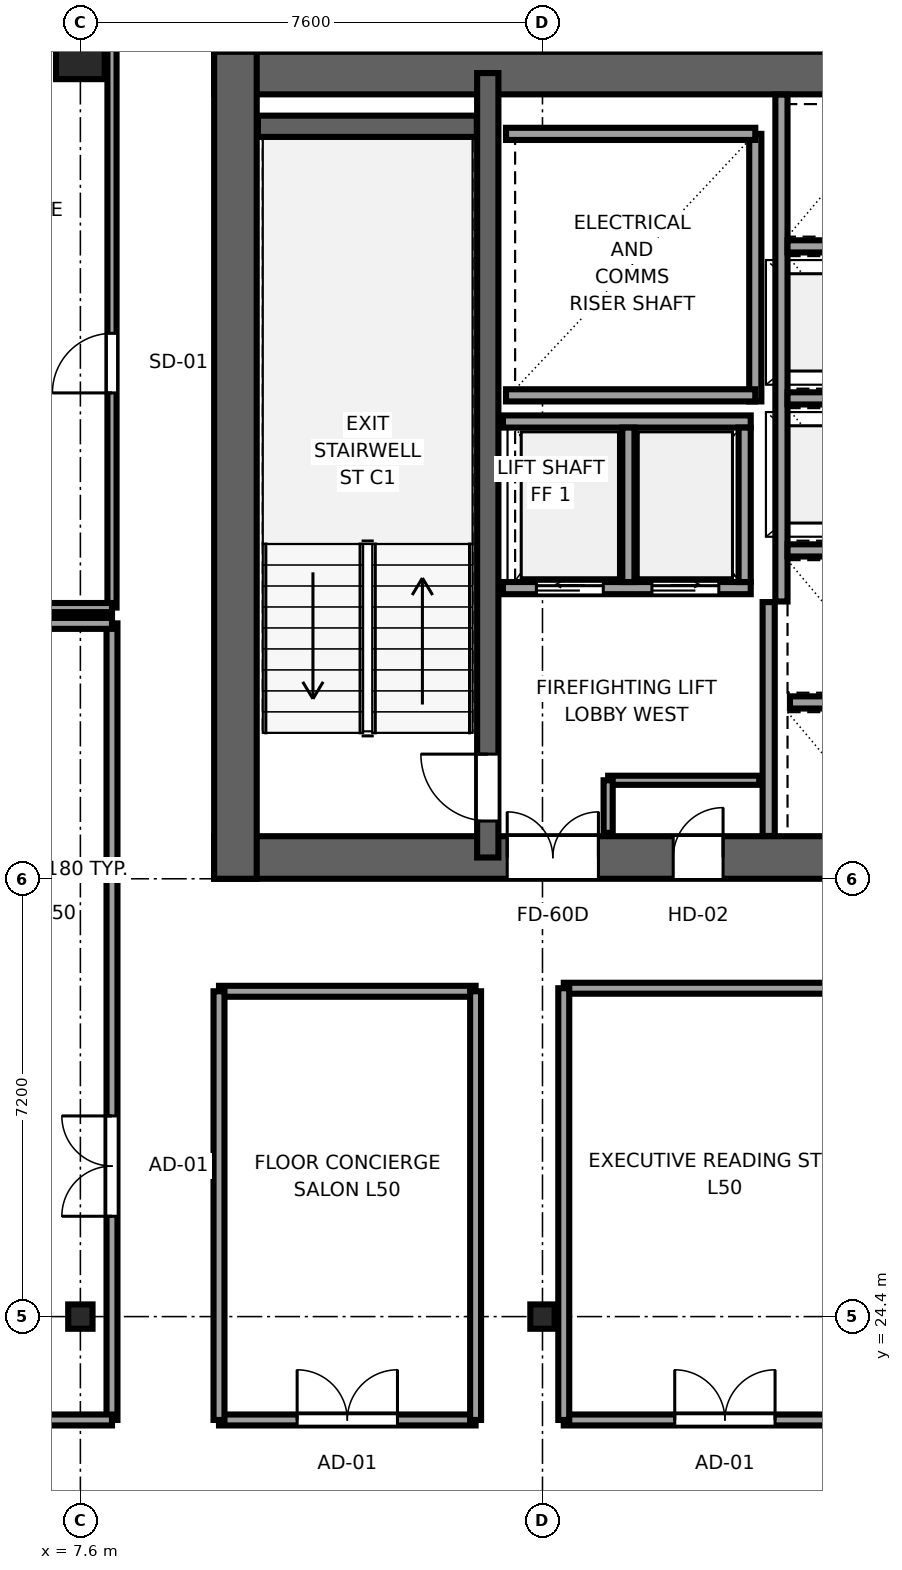
"""IFC4 building model, lengths in metres.
Left out: names, types, materials, properties, quantities, classifications, styles, units other than length and angle.
Written with IfcOpenShell. Run it as: python <this file> out.ifc"""

import sys

from ifc_helpers import new_model, si_unit, direction, frame, frame_2d, origin, origin_2d, place, context, subcontext, project, spatial, rectangle, i_section, extrude, source, transform, mapped, element, fill, save


model = new_model("IFC4")
c1 = context("Model", 3, precision=1e-05, world=origin(), true_north=direction((0.0, 1.0)))
c2 = subcontext(c1, "Body", "Model", "MODEL_VIEW")
j1 = project(units=[si_unit("LENGTHUNIT", "METRE"), si_unit("PLANEANGLEUNIT", "RADIAN")], contexts=[c1])
p1 = place(None, origin())
s1 = spatial("IfcSite", under=j1, at=p1, CompositionType="ELEMENT")
p2 = place(p1, origin())
s2 = spatial("IfcBuilding", under=s1, at=p2, CompositionType="ELEMENT")
p3 = place(p2, frame((0.0, 0.0, 191.1)))
s3 = spatial("IfcBuildingStorey", under=s2, at=p3, CompositionType="ELEMENT", Elevation=191.1)
p4 = place(p3, frame((9.8, 31.95, 0.0), z_axis=(0.0, 0.0, 1.0), x_axis=(1.0, 0.0, 0.0)))
e1 = element("IfcWall", 1, at=p4, inside=s3, PredefinedType="SHEAR", context=c2, shape_type="SweptSolid", body=[
    extrude(rectangle(XDim=26.4, YDim=0.7, at=frame_2d((13.2, 0.0))), origin(), (0.0, 0.0, 1.0), 3.55),
])
p5 = place(p4, frame((6.32, 0.0, 0.0), z_axis=(0.0, 0.0, 1.0), x_axis=(-1.0, 0.0, 0.0)))
e2 = element("IfcOpeningElement", 2, at=p5, cuts=e1, PredefinedType="OPENING", context=c2, shape_type="SweptSolid", body=[
    extrude(rectangle(XDim=1.5, YDim=2.04, at=frame_2d((0.75, 1.02))), frame((0.0, 0.36, 0.0), z_axis=(0.0, -1.0, 0.0), x_axis=(1.0, 0.0, 0.0)), (0.0, 0.0, 1.0), 0.72),
])
p6 = place(p4, frame((13.95, 0.0, 0.0), z_axis=(0.0, 0.0, 1.0), x_axis=(-1.0, 0.0, 0.0)))
e3 = element("IfcOpeningElement", 3, at=p6, cuts=e1, PredefinedType="OPENING", context=c2, shape_type="SweptSolid", body=[
    extrude(rectangle(XDim=1.5, YDim=2.04, at=frame_2d((0.75, 1.02))), frame((0.0, 0.36, 0.0), z_axis=(0.0, -1.0, 0.0), x_axis=(1.0, 0.0, 0.0)), (0.0, 0.0, 1.0), 0.72),
])
p7 = place(p4, frame((21.58, 0.0, 0.0), z_axis=(0.0, 0.0, 1.0), x_axis=(-1.0, 0.0, 0.0)))
e4 = element("IfcOpeningElement", 4, at=p7, cuts=e1, PredefinedType="OPENING", context=c2, shape_type="SweptSolid", body=[
    extrude(rectangle(XDim=1.5, YDim=2.04, at=frame_2d((0.75, 1.02))), frame((0.0, 0.36, 0.0), z_axis=(0.0, -1.0, 0.0), x_axis=(1.0, 0.0, 0.0)), (0.0, 0.0, 1.0), 0.72),
])
p8 = place(p4, frame((8.37, 0.0, 0.0), z_axis=(0.0, 0.0, 1.0), x_axis=(-1.0, 0.0, 0.0)))
e5 = element("IfcOpeningElement", 5, at=p8, cuts=e1, PredefinedType="OPENING", context=c2, shape_type="SweptSolid", body=[
    extrude(rectangle(XDim=0.82, YDim=2.01, at=frame_2d((0.41, 1.005))), frame((0.0, 0.36, 0.0), z_axis=(0.0, -1.0, 0.0), x_axis=(1.0, 0.0, 0.0)), (0.0, 0.0, 1.0), 0.72),
])
p9 = place(p4, frame((18.87, 0.0, 0.0), z_axis=(0.0, 0.0, 1.0), x_axis=(-1.0, 0.0, 0.0)))
e6 = element("IfcOpeningElement", 6, at=p9, cuts=e1, PredefinedType="OPENING", context=c2, shape_type="SweptSolid", body=[
    extrude(rectangle(XDim=0.82, YDim=2.01, at=frame_2d((0.41, 1.005))), frame((0.0, 0.36, 0.0), z_axis=(0.0, -1.0, 0.0), x_axis=(1.0, 0.0, 0.0)), (0.0, 0.0, 1.0), 0.72),
])
p10 = place(p3, frame((9.8, 44.85, 0.0), z_axis=(0.0, 0.0, 1.0), x_axis=(1.0, 0.0, 0.0)))
e7 = element("IfcWall", 7, at=p10, inside=s3, PredefinedType="SHEAR", context=c2, shape_type="SweptSolid", body=[
    extrude(rectangle(XDim=26.4, YDim=0.7, at=frame_2d((13.2, 0.0))), origin(), (0.0, 0.0, 1.0), 3.55),
])
p11 = place(p3, frame((10.15, 31.6, 0.0), z_axis=(0.0, 0.0, 1.0), x_axis=(0.0, 1.0, 0.0)))
e8 = element("IfcWall", 8, at=p11, inside=s3, PredefinedType="SHEAR", context=c2, shape_type="SweptSolid", body=[
    extrude(rectangle(XDim=13.6, YDim=0.7, at=frame_2d((6.8, 0.0))), origin(), (0.0, 0.0, 1.0), 3.55),
])
p12 = place(p3, frame((14.3, 31.95, 0.0), z_axis=(0.0, 0.0, 1.0), x_axis=(0.0, 1.0, 0.0)))
e9 = element("IfcWall", 9, at=p12, inside=s3, PredefinedType="SHEAR", context=c2, shape_type="SweptSolid", body=[
    extrude(rectangle(XDim=12.9, YDim=0.35, at=frame_2d((6.45, 0.0))), origin(), (0.0, 0.0, 1.0), 3.55),
])
p13 = place(p12, frame((0.6, 0.0, 0.0)))
e10 = element("IfcOpeningElement", 10, at=p13, cuts=e9, PredefinedType="OPENING", context=c2, shape_type="SweptSolid", body=[
    extrude(rectangle(XDim=1.1, YDim=2.12, at=frame_2d((0.55, 1.06))), frame((0.0, 0.185, 0.0), z_axis=(0.0, -1.0, 0.0), x_axis=(1.0, 0.0, 0.0)), (0.0, 0.0, 1.0), 0.37),
])
p14 = place(p3, frame((10.52, 43.975, 0.0), z_axis=(0.0, 0.0, 1.0), x_axis=(1.0, 0.0, 0.0)))
e11 = element("IfcWall", 11, at=p14, inside=s3, PredefinedType="SHEAR", context=c2, shape_type="SweptSolid", body=[
    extrude(rectangle(XDim=3.6, YDim=0.35, at=frame_2d((1.8, 0.0))), origin(), (0.0, 0.0, 1.0), 3.55),
])
m1 = source(origin(), c2, "Body", "SweptSolid", [
    extrude(i_section(OverallWidth=0.4, OverallDepth=0.4, WebThickness=0.02, FlangeThickness=0.035, at=origin_2d()), origin(), (0.0, 0.0, 1.0), 3.55),
])
for number, where, z_axis, x_axis in (
    (12, (7.6, 24.4, 0.0), (0.0, 0.0, 1.0), (1.0, 0.0, 0.0)),
    (13, (15.2, 24.4, 0.0), (0.0, 0.0, 1.0), (1.0, 0.0, 0.0)),
):
    element("IfcColumn", number, at=place(p3, frame(where, z_axis=z_axis, x_axis=x_axis)), inside=s3, PredefinedType="COLUMN", context=c2, shape_type="MappedRepresentation", body=[
        mapped(m1, transform((0.0, 0.0, 0.0), x_axis=(1.0, 0.0, 0.0), y_axis=(0.0, 1.0, 0.0), z_axis=(0.0, 0.0, 1.0), scale=1.0)),
    ])
m2 = source(origin(), c2, "Body", "SweptSolid", [
    extrude(rectangle(XDim=0.8, YDim=0.8, at=origin_2d()), origin(), (0.0, 0.0, 1.0), 3.55),
])
p15 = place(p3, frame((7.6, 45.15, 0.0), z_axis=(0.0, 0.0, 1.0), x_axis=(1.0, 0.0, 0.0)))
e14 = element("IfcColumn", 14, at=p15, inside=s3, PredefinedType="COLUMN", context=c2, shape_type="MappedRepresentation", body=[
    mapped(m2, transform((0.0, 0.0, 0.0), x_axis=(1.0, 0.0, 0.0), y_axis=(0.0, 1.0, 0.0), z_axis=(0.0, 0.0, 1.0), scale=1.0)),
])
p16 = place(p3, frame((18.7, 39.45, 0.0), z_axis=(0.0, 0.0, 1.0), x_axis=(0.0, 1.0, 0.0)))
e15 = element("IfcWall", 15, at=p16, inside=s3, PredefinedType="SOLIDWALL", context=c2, shape_type="SweptSolid", body=[
    extrude(rectangle(XDim=4.4, YDim=0.2, at=frame_2d((2.2, 0.0))), origin(), (0.0, 0.0, 1.0), 3.37),
])
for number, where, z_axis, x_axis in (
    (16, (14.6, 39.55, 0.0), (0.0, 0.0, 1.0), (1.0, 0.0, 0.0)),
    (17, (14.6, 43.85, 0.0), (0.0, 0.0, 1.0), (1.0, 0.0, 0.0)),
):
    element("IfcWall", number, at=place(p3, frame(where, z_axis=z_axis, x_axis=x_axis)), inside=s3, PredefinedType="SOLIDWALL", context=c2, shape_type="SweptSolid", body=[
        extrude(rectangle(XDim=4.1, YDim=0.2, at=frame_2d((2.05, 0.0))), origin(), (0.0, 0.0, 1.0), 3.37),
    ])
p17 = place(p3, frame((18.92, 32.304, 0.0), z_axis=(0.0, 0.0, 1.0), x_axis=(0.0, 1.0, 0.0)))
e18 = element("IfcWall", 18, at=p17, inside=s3, PredefinedType="SOLIDWALL", context=c2, shape_type="SweptSolid", body=[
    extrude(rectangle(XDim=3.846, YDim=0.2, at=frame_2d((1.923, 0.0))), origin(), (0.0, 0.0, 1.0), 3.37),
])
p18 = place(p3, frame((19.13, 36.16, 0.0), z_axis=(0.0, 0.0, 1.0), x_axis=(0.0, 1.0, 0.0)))
e19 = element("IfcWall", 19, at=p18, inside=s3, PredefinedType="SOLIDWALL", context=c2, shape_type="SweptSolid", body=[
    extrude(rectangle(XDim=8.336, YDim=0.2, at=frame_2d((4.168, 0.0))), origin(), (0.0, 0.0, 1.0), 3.37),
])
p19 = place(p3, frame((19.27, 34.5, 0.0), z_axis=(0.0, 0.0, 1.0), x_axis=(1.0, 0.0, 0.0)))
e20 = element("IfcWall", 20, at=p19, inside=s3, PredefinedType="SOLIDWALL", context=c2, shape_type="SweptSolid", body=[
    extrude(rectangle(XDim=1.8, YDim=0.2, at=frame_2d((0.9, 0.0))), origin(), (0.0, 0.0, 1.0), 3.37),
])
for number, where, z_axis, x_axis in (
    (21, (19.23, 37.0, 0.0), (0.0, 0.0, 1.0), (1.0, 0.0, 0.0)),
    (22, (19.23, 39.5, 0.0), (0.0, 0.0, 1.0), (1.0, 0.0, 0.0)),
    (23, (19.23, 42.0, 0.0), (0.0, 0.0, 1.0), (1.0, 0.0, 0.0)),
):
    element("IfcWall", number, at=place(p3, frame(where, z_axis=z_axis, x_axis=x_axis)), inside=s3, PredefinedType="SOLIDWALL", context=c2, shape_type="SweptSolid", body=[
        extrude(rectangle(XDim=1.84, YDim=0.2, at=frame_2d((0.92, 0.0))), origin(), (0.0, 0.0, 1.0), 3.37),
    ])
p20 = place(p3, frame((14.55, 36.38, 0.0), z_axis=(0.0, 0.0, 1.0), x_axis=(1.0, 0.0, 0.0)))
e24 = element("IfcWall", 24, at=p20, inside=s3, PredefinedType="SOLIDWALL", context=c2, shape_type="SweptSolid", body=[
    extrude(rectangle(XDim=4.075, YDim=0.2, at=frame_2d((2.038, 0.0))), origin(), (0.0, 0.0, 1.0), 3.37),
])
p21 = place(p20, frame((0.55, 0.0, 0.0)))
e25 = element("IfcOpeningElement", 25, at=p21, cuts=e24, PredefinedType="OPENING", context=c2, shape_type="SweptSolid", body=[
    extrude(rectangle(XDim=1.1, YDim=2.12, at=frame_2d((0.55, 1.06))), frame((0.0, 0.11, 0.0), z_axis=(0.0, -1.0, 0.0), x_axis=(1.0, 0.0, 0.0)), (0.0, 0.0, 1.0), 0.22),
])
p22 = place(p20, frame((2.45, 0.0, 0.0)))
e26 = element("IfcOpeningElement", 26, at=p22, cuts=e24, PredefinedType="OPENING", context=c2, shape_type="SweptSolid", body=[
    extrude(rectangle(XDim=1.1, YDim=2.12, at=frame_2d((0.55, 1.06))), frame((0.0, 0.11, 0.0), z_axis=(0.0, -1.0, 0.0), x_axis=(1.0, 0.0, 0.0)), (0.0, 0.0, 1.0), 0.22),
])
p23 = place(p3, frame((14.55, 39.12, 0.0), z_axis=(0.0, 0.0, 1.0), x_axis=(1.0, 0.0, 0.0)))
e27 = element("IfcWall", 27, at=p23, inside=s3, PredefinedType="SOLIDWALL", context=c2, shape_type="SweptSolid", body=[
    extrude(rectangle(XDim=4.075, YDim=0.2, at=frame_2d((2.038, 0.0))), origin(), (0.0, 0.0, 1.0), 3.37),
])
for number, where, z_axis, x_axis in (
    (28, (18.525, 36.48, 0.0), (0.0, 0.0, 1.0), (0.0, 1.0, 0.0)),
    (29, (16.613, 36.48, 0.0), (0.0, 0.0, 1.0), (0.0, 1.0, 0.0)),
):
    element("IfcWall", number, at=place(p3, frame(where, z_axis=z_axis, x_axis=x_axis)), inside=s3, PredefinedType="SOLIDWALL", context=c2, shape_type="SweptSolid", body=[
        extrude(rectangle(XDim=2.54, YDim=0.2, at=frame_2d((1.27, 0.0))), origin(), (0.0, 0.0, 1.0), 3.37),
    ])
p24 = place(p3, frame((16.28, 33.22, 0.0), z_axis=(0.0, 0.0, 1.0), x_axis=(1.0, 0.0, 0.0)))
e30 = element("IfcWall", 30, at=p24, inside=s3, PredefinedType="PARTITIONING", context=c2, shape_type="SweptSolid", body=[
    extrude(rectangle(XDim=2.485, YDim=0.15, at=frame_2d((1.242, 0.0))), origin(), (0.0, 0.0, 1.0), 3.37),
])
p25 = place(p3, frame((16.28, 32.355, 0.0), z_axis=(0.0, 0.0, 1.0), x_axis=(0.0, 1.0, 0.0)))
e31 = element("IfcWall", 31, at=p25, inside=s3, PredefinedType="PARTITIONING", context=c2, shape_type="SweptSolid", body=[
    extrude(rectangle(XDim=0.865, YDim=0.15, at=frame_2d((0.433, 0.0))), origin(), (0.0, 0.0, 1.0), 3.37),
])
p26 = place(p3, frame((8.12, 22.7, 0.0), z_axis=(0.0, 0.0, 1.0), x_axis=(0.0, 1.0, 0.0)))
e32 = element("IfcWall", 32, at=p26, inside=s3, PredefinedType="PARTITIONING", context=c2, shape_type="SweptSolid", body=[
    extrude(rectangle(XDim=13.1, YDim=0.18, at=frame_2d((6.55, 0.0))), origin(), (0.0, 0.0, 1.0), 3.37),
])
p27 = place(p26, frame((3.35, 0.0, 0.0)))
e33 = element("IfcOpeningElement", 33, at=p27, cuts=e32, PredefinedType="OPENING", context=c2, shape_type="SweptSolid", body=[
    extrude(rectangle(XDim=1.65, YDim=2.15, at=frame_2d((0.825, 1.075))), frame((0.0, 0.1, 0.0), z_axis=(0.0, -1.0, 0.0), x_axis=(1.0, 0.0, 0.0)), (0.0, 0.0, 1.0), 0.2),
])
for number, where, z_axis, x_axis in (
    (34, (3.005, 22.7, 0.0), (0.0, 0.0, 1.0), (1.0, 0.0, 0.0)),
    (35, (3.005, 35.8, 0.0), (0.0, 0.0, 1.0), (1.0, 0.0, 0.0)),
):
    element("IfcWall", number, at=place(p3, frame(where, z_axis=z_axis, x_axis=x_axis)), inside=s3, PredefinedType="PARTITIONING", context=c2, shape_type="SweptSolid", body=[
        extrude(rectangle(XDim=5.115, YDim=0.18, at=frame_2d((2.558, 0.0))), origin(), (0.0, 0.0, 1.0), 3.37),
    ])
p28 = place(p3, frame((8.12, 36.06, 0.0), z_axis=(0.0, 0.0, 1.0), x_axis=(0.0, 1.0, 0.0)))
e36 = element("IfcWall", 36, at=p28, inside=s3, PredefinedType="PARTITIONING", context=c2, shape_type="SweptSolid", body=[
    extrude(rectangle(XDim=9.535, YDim=0.15, at=frame_2d((4.768, 0.0))), origin(), (0.0, 0.0, 1.0), 3.37),
])
p29 = place(p28, frame((3.53, 0.0, 0.0)))
e37 = element("IfcOpeningElement", 37, at=p29, cuts=e36, PredefinedType="OPENING", context=c2, shape_type="SweptSolid", body=[
    extrude(rectangle(XDim=0.98, YDim=2.12, at=frame_2d((0.49, 1.06))), frame((0.0, 0.085, 0.0), z_axis=(0.0, -1.0, 0.0), x_axis=(1.0, 0.0, 0.0)), (0.0, 0.0, 1.0), 0.17),
])
p30 = place(p3, frame((5.07, 36.06, 0.0), z_axis=(0.0, 0.0, 1.0), x_axis=(1.0, 0.0, 0.0)))
e38 = element("IfcWall", 38, at=p30, inside=s3, PredefinedType="PARTITIONING", context=c2, shape_type="SweptSolid", body=[
    extrude(rectangle(XDim=3.05, YDim=0.15, at=frame_2d((1.525, 0.0))), origin(), (0.0, 0.0, 1.0), 3.37),
])
p31 = place(p3, frame((9.88, 22.7, 0.0), z_axis=(0.0, 0.0, 1.0), x_axis=(1.0, 0.0, 0.0)))
e39 = element("IfcWall", 39, at=p31, inside=s3, PredefinedType="PARTITIONING", context=c2, shape_type="SweptSolid", body=[
    extrude(rectangle(XDim=4.22, YDim=0.18, at=frame_2d((2.11, 0.0))), origin(), (0.0, 0.0, 1.0), 3.37),
])
p32 = place(p31, frame((1.285, 0.0, 0.0)))
e40 = element("IfcOpeningElement", 40, at=p32, cuts=e39, PredefinedType="OPENING", context=c2, shape_type="SweptSolid", body=[
    extrude(rectangle(XDim=1.65, YDim=2.15, at=frame_2d((0.825, 1.075))), frame((0.0, 0.1, 0.0), z_axis=(0.0, -1.0, 0.0), x_axis=(1.0, 0.0, 0.0)), (0.0, 0.0, 1.0), 0.2),
])
p33 = place(p3, frame((9.88, 29.75, 0.0), z_axis=(0.0, 0.0, 1.0), x_axis=(1.0, 0.0, 0.0)))
e41 = element("IfcWall", 41, at=p33, inside=s3, PredefinedType="PARTITIONING", context=c2, shape_type="SweptSolid", body=[
    extrude(rectangle(XDim=4.22, YDim=0.18, at=frame_2d((2.11, 0.0))), origin(), (0.0, 0.0, 1.0), 3.37),
])
for number, where, z_axis, x_axis in (
    (42, (9.88, 22.7, 0.0), (0.0, 0.0, 1.0), (0.0, 1.0, 0.0)),
    (43, (14.1, 22.7, 0.0), (0.0, 0.0, 1.0), (0.0, 1.0, 0.0)),
):
    element("IfcWall", number, at=place(p3, frame(where, z_axis=z_axis, x_axis=x_axis)), inside=s3, PredefinedType="PARTITIONING", context=c2, shape_type="SweptSolid", body=[
        extrude(rectangle(XDim=7.05, YDim=0.18, at=frame_2d((3.525, 0.0))), origin(), (0.0, 0.0, 1.0), 3.37),
    ])
p34 = place(p3, frame((15.55, 22.7, 0.0), z_axis=(0.0, 0.0, 1.0), x_axis=(1.0, 0.0, 0.0)))
e44 = element("IfcWall", 44, at=p34, inside=s3, PredefinedType="PARTITIONING", context=c2, shape_type="SweptSolid", body=[
    extrude(rectangle(XDim=5.3, YDim=0.18, at=frame_2d((2.65, 0.0))), origin(), (0.0, 0.0, 1.0), 3.37),
])
p35 = place(p34, frame((1.825, 0.0, 0.0)))
e45 = element("IfcOpeningElement", 45, at=p35, cuts=e44, PredefinedType="OPENING", context=c2, shape_type="SweptSolid", body=[
    extrude(rectangle(XDim=1.65, YDim=2.15, at=frame_2d((0.825, 1.075))), frame((0.0, 0.1, 0.0), z_axis=(0.0, -1.0, 0.0), x_axis=(1.0, 0.0, 0.0)), (0.0, 0.0, 1.0), 0.2),
])
p36 = place(p3, frame((15.55, 29.8, 0.0), z_axis=(0.0, 0.0, 1.0), x_axis=(1.0, 0.0, 0.0)))
e46 = element("IfcWall", 46, at=p36, inside=s3, PredefinedType="PARTITIONING", context=c2, shape_type="SweptSolid", body=[
    extrude(rectangle(XDim=5.3, YDim=0.18, at=frame_2d((2.65, 0.0))), origin(), (0.0, 0.0, 1.0), 3.37),
])
p37 = place(p3, frame((15.55, 22.7, 0.0), z_axis=(0.0, 0.0, 1.0), x_axis=(0.0, 1.0, 0.0)))
e47 = element("IfcWall", 47, at=p37, inside=s3, PredefinedType="PARTITIONING", context=c2, shape_type="SweptSolid", body=[
    extrude(rectangle(XDim=7.1, YDim=0.18, at=frame_2d((3.55, 0.0))), origin(), (0.0, 0.0, 1.0), 3.37),
])
m3 = source(origin(), c2, "Body", "SweptSolid", [
    extrude(rectangle(XDim=1.1, YDim=2.12, at=frame_2d((0.55, 1.06))), frame((0.0, 0.025, 0.0), z_axis=(0.0, -1.0, 0.0), x_axis=(1.0, 0.0, 0.0)), (0.0, 0.0, 1.0), 0.05),
])
p38 = place(p13, origin())
e48 = element("IfcDoor", 48, at=p38, inside=s3, OperationType="SINGLE_SWING_RIGHT", PredefinedType="DOOR", context=c2, shape_type="MappedRepresentation", body=[
    mapped(m3, transform((0.0, 0.0, 0.0), x_axis=(1.0, 0.0, 0.0), y_axis=(0.0, 1.0, 0.0), z_axis=(0.0, 0.0, 1.0), scale=1.0)),
])
fill(e10, e48)
m4 = source(origin(), c2, "Body", "SweptSolid", [
    extrude(rectangle(XDim=1.5, YDim=2.04, at=frame_2d((0.75, 1.02))), frame((0.0, 0.025, 0.0), z_axis=(0.0, -1.0, 0.0), x_axis=(1.0, 0.0, 0.0)), (0.0, 0.0, 1.0), 0.05),
])
p39 = place(p5, origin())
e49 = element("IfcDoor", 49, at=p39, inside=s3, OperationType="DOUBLE_DOOR_SINGLE_SWING", PredefinedType="DOOR", context=c2, shape_type="MappedRepresentation", body=[
    mapped(m4, transform((0.0, 0.0, 0.0), x_axis=(1.0, 0.0, 0.0), y_axis=(0.0, 1.0, 0.0), z_axis=(0.0, 0.0, 1.0), scale=1.0)),
])
fill(e2, e49)
m5 = source(origin(), c2, "Body", "SweptSolid", [
    extrude(rectangle(XDim=0.82, YDim=2.01, at=frame_2d((0.41, 1.005))), frame((0.0, 0.025, 0.0), z_axis=(0.0, -1.0, 0.0), x_axis=(1.0, 0.0, 0.0)), (0.0, 0.0, 1.0), 0.05),
])
p40 = place(p8, origin())
e50 = element("IfcDoor", 50, at=p40, inside=s3, OperationType="SINGLE_SWING_RIGHT", PredefinedType="DOOR", context=c2, shape_type="MappedRepresentation", body=[
    mapped(m5, transform((0.0, 0.0, 0.0), x_axis=(1.0, 0.0, 0.0), y_axis=(0.0, 1.0, 0.0), z_axis=(0.0, 0.0, 1.0), scale=1.0)),
])
fill(e5, e50)
m6 = source(origin(), c2, "Body", "SweptSolid", [
    extrude(rectangle(XDim=1.1, YDim=2.12, at=frame_2d((0.55, 1.06))), frame((0.0, 0.025, 0.0), z_axis=(0.0, -1.0, 0.0), x_axis=(1.0, 0.0, 0.0)), (0.0, 0.0, 1.0), 0.05),
])
p41 = place(p21, origin())
e51 = element("IfcDoor", 51, at=p41, inside=s3, OperationType="SLIDING_TO_LEFT", PredefinedType="DOOR", context=c2, shape_type="MappedRepresentation", body=[
    mapped(m6, transform((0.0, 0.0, 0.0), x_axis=(1.0, 0.0, 0.0), y_axis=(0.0, 1.0, 0.0), z_axis=(0.0, 0.0, 1.0), scale=1.0)),
])
fill(e25, e51)
p42 = place(p22, origin())
e52 = element("IfcDoor", 52, at=p42, inside=s3, OperationType="SLIDING_TO_RIGHT", PredefinedType="DOOR", context=c2, shape_type="MappedRepresentation", body=[
    mapped(m6, transform((0.0, 0.0, 0.0), x_axis=(1.0, 0.0, 0.0), y_axis=(0.0, 1.0, 0.0), z_axis=(0.0, 0.0, 1.0), scale=1.0)),
])
fill(e26, e52)
m7 = source(origin(), c2, "Body", "SweptSolid", [
    extrude(rectangle(XDim=1.65, YDim=2.15, at=frame_2d((0.825, 1.075))), frame((0.0, 0.025, 0.0), z_axis=(0.0, -1.0, 0.0), x_axis=(1.0, 0.0, 0.0)), (0.0, 0.0, 1.0), 0.05),
])
p43 = place(p27, origin())
e53 = element("IfcDoor", 53, at=p43, inside=s3, OperationType="DOUBLE_DOOR_SINGLE_SWING", PredefinedType="DOOR", context=c2, shape_type="MappedRepresentation", body=[
    mapped(m7, transform((0.0, 0.0, 0.0), x_axis=(1.0, 0.0, 0.0), y_axis=(0.0, 1.0, 0.0), z_axis=(0.0, 0.0, 1.0), scale=1.0)),
])
fill(e33, e53)
m8 = source(origin(), c2, "Body", "SweptSolid", [
    extrude(rectangle(XDim=0.98, YDim=2.12, at=frame_2d((0.49, 1.06))), frame((0.0, 0.025, 0.0), z_axis=(0.0, -1.0, 0.0), x_axis=(1.0, 0.0, 0.0)), (0.0, 0.0, 1.0), 0.05),
])
p44 = place(p29, origin())
e54 = element("IfcDoor", 54, at=p44, inside=s3, OperationType="SINGLE_SWING_LEFT", PredefinedType="DOOR", context=c2, shape_type="MappedRepresentation", body=[
    mapped(m8, transform((0.0, 0.0, 0.0), x_axis=(1.0, 0.0, 0.0), y_axis=(0.0, 1.0, 0.0), z_axis=(0.0, 0.0, 1.0), scale=1.0)),
])
fill(e37, e54)
p45 = place(p32, origin())
e55 = element("IfcDoor", 55, at=p45, inside=s3, OperationType="DOUBLE_DOOR_SINGLE_SWING", PredefinedType="DOOR", context=c2, shape_type="MappedRepresentation", body=[
    mapped(m7, transform((0.0, 0.0, 0.0), x_axis=(1.0, 0.0, 0.0), y_axis=(0.0, 1.0, 0.0), z_axis=(0.0, 0.0, 1.0), scale=1.0)),
])
fill(e40, e55)
p46 = place(p35, origin())
e56 = element("IfcDoor", 56, at=p46, inside=s3, OperationType="DOUBLE_DOOR_SINGLE_SWING", PredefinedType="DOOR", context=c2, shape_type="MappedRepresentation", body=[
    mapped(m7, transform((0.0, 0.0, 0.0), x_axis=(1.0, 0.0, 0.0), y_axis=(0.0, 1.0, 0.0), z_axis=(0.0, 0.0, 1.0), scale=1.0)),
])
fill(e45, e56)
save(model, sys.argv[1])
